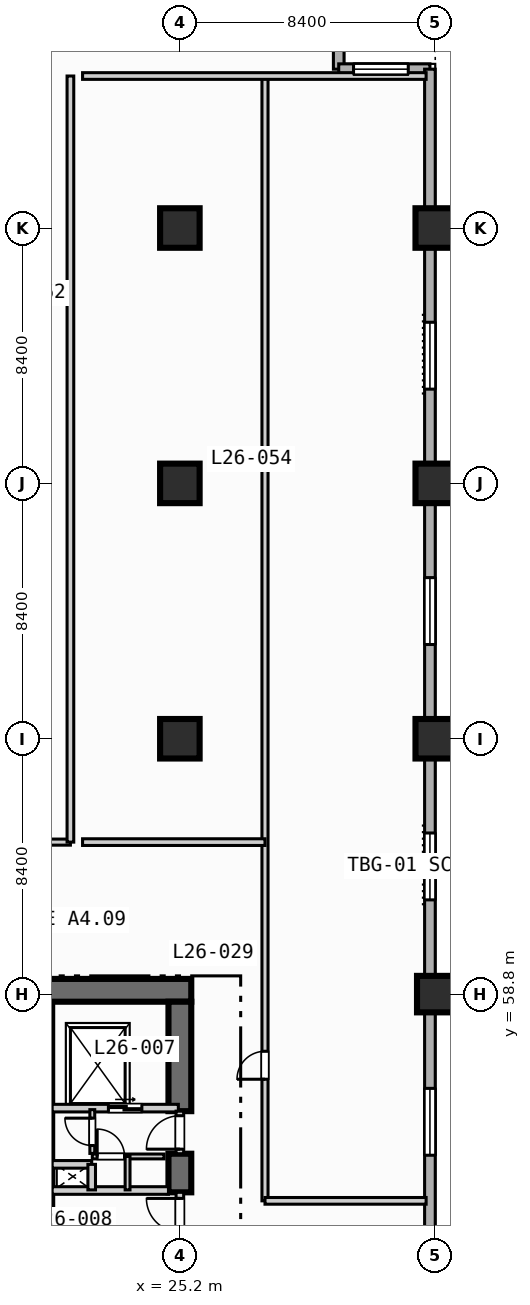
"""IFC4 building model, lengths in metres.
Left out: names, types, materials, properties, quantities, classifications, styles, units other than length and angle.
Written with IfcOpenShell. Run it as: python <this file> out.ifc"""

import sys

from ifc_helpers import new_model, si_unit, direction, frame, frame_2d, origin, origin_2d, place, context, subcontext, project, spatial, rectangle, extrude, element, fill, save


model = new_model("IFC4")
c1 = context("Model", 3, precision=1e-05, world=origin(), true_north=direction((0.0, 1.0)))
c2 = subcontext(c1, "Body", "Model", "MODEL_VIEW")
j1 = project(units=[si_unit("LENGTHUNIT", "METRE"), si_unit("PLANEANGLEUNIT", "RADIAN")], contexts=[c1])
p1 = place(None, origin())
s1 = spatial("IfcSite", under=j1, at=p1, CompositionType="ELEMENT")
p2 = place(p1, origin())
s2 = spatial("IfcBuilding", under=s1, at=p2, CompositionType="ELEMENT")
p3 = place(p2, frame((0.0, 0.0, 111.4)))
s3 = spatial("IfcBuildingStorey", under=s2, at=p3, CompositionType="ELEMENT", Elevation=111.4)
p4 = place(p3, frame((20.5, 58.925, 0.0), z_axis=(0.0, 0.0, 1.0), x_axis=(1.0, 0.0, 0.0)))
e1 = element("IfcWall", 1, at=p4, inside=s3, PredefinedType="SHEAR", context=c2, shape_type="SweptSolid", body=[
    extrude(rectangle(XDim=5.075, YDim=0.75, at=frame_2d((2.538, 0.0))), origin(), (0.0, 0.0, 1.0), 3.55),
])
p5 = place(p3, frame((25.2, 52.28, 0.0), z_axis=(0.0, 0.0, 1.0), x_axis=(0.0, 1.0, 0.0)))
e2 = element("IfcWall", 2, at=p5, inside=s3, PredefinedType="SHEAR", context=c2, shape_type="SweptSolid", body=[
    extrude(rectangle(XDim=1.27, YDim=0.75, at=frame_2d((0.635, 0.0))), origin(), (0.0, 0.0, 1.0), 3.55),
])
p6 = place(p3, frame((25.2, 54.95, 0.0), z_axis=(0.0, 0.0, 1.0), x_axis=(0.0, 1.0, 0.0)))
e3 = element("IfcWall", 3, at=p6, inside=s3, PredefinedType="SHEAR", context=c2, shape_type="SweptSolid", body=[
    extrude(rectangle(XDim=3.6, YDim=0.75, at=frame_2d((1.8, 0.0))), origin(), (0.0, 0.0, 1.0), 3.55),
])
for number, where, z_axis, x_axis in (
    (4, (25.2, 67.2, 0.0), (0.0, 0.0, 1.0), (1.0, 0.0, 0.0)),
    (5, (25.2, 75.6, 0.0), (0.0, 0.0, 1.0), (1.0, 0.0, 0.0)),
    (6, (25.2, 84.0, 0.0), (0.0, 0.0, 1.0), (1.0, 0.0, 0.0)),
):
    element("IfcColumn", number, at=place(p3, frame(where, z_axis=z_axis, x_axis=x_axis)), inside=s3, PredefinedType="COLUMN", context=c2, shape_type="SweptSolid", body=[
        extrude(rectangle(XDim=1.3, YDim=1.3, at=origin_2d()), origin(), (0.0, 0.0, 1.0), 3.8),
    ])
p7 = place(p3, frame((33.6, 58.8, 0.0), z_axis=(0.0, 0.0, 1.0), x_axis=(1.0, 0.0, 0.0)))
e7 = element("IfcColumn", 7, at=p7, inside=s3, PredefinedType="COLUMN", context=c2, shape_type="SweptSolid", body=[
    extrude(rectangle(XDim=1.2, YDim=1.2, at=origin_2d()), origin(), (0.0, 0.0, 1.0), 3.8),
])
for number, where, z_axis, x_axis in (
    (8, (33.6, 67.2, 0.0), (0.0, 0.0, 1.0), (1.0, 0.0, 0.0)),
    (9, (33.6, 75.6, 0.0), (0.0, 0.0, 1.0), (1.0, 0.0, 0.0)),
    (10, (33.6, 84.0, 0.0), (0.0, 0.0, 1.0), (1.0, 0.0, 0.0)),
):
    element("IfcColumn", number, at=place(p3, frame(where, z_axis=z_axis, x_axis=x_axis)), inside=s3, PredefinedType="COLUMN", context=c2, shape_type="SweptSolid", body=[
        extrude(rectangle(XDim=1.3, YDim=1.3, at=origin_2d()), origin(), (0.0, 0.0, 1.0), 3.8),
    ])
p8 = place(p3, frame((30.425, 92.225, 0.0), z_axis=(0.0, 0.0, 1.0), x_axis=(0.0, -1.0, 0.0)))
e11 = element("IfcWall", 11, at=p8, inside=s3, PredefinedType="STANDARD", context=c2, shape_type="SweptSolid", body=[
    extrude(rectangle(XDim=3.0, YDim=0.35, at=frame_2d((1.5, 0.0))), origin(), (0.0, 0.0, 1.0), 3.55),
])
p9 = place(p3, frame((30.425, 89.225, 0.0), z_axis=(0.0, 0.0, 1.0), x_axis=(1.0, 0.0, 0.0)))
e12 = element("IfcWall", 12, at=p9, inside=s3, PredefinedType="STANDARD", context=c2, shape_type="SweptSolid", body=[
    extrude(rectangle(XDim=3.0, YDim=0.35, at=frame_2d((1.5, 0.0))), origin(), (0.0, 0.0, 1.0), 3.55),
])
p10 = place(p9, frame((0.488, 0.0, 0.85)))
e13 = element("IfcOpeningElement", 13, at=p10, cuts=e12, PredefinedType="OPENING", context=c2, shape_type="SweptSolid", body=[
    extrude(rectangle(XDim=1.8, YDim=1.8, at=frame_2d((0.9, 0.9))), frame((0.0, 0.185, 0.0), z_axis=(0.0, -1.0, 0.0), x_axis=(1.0, 0.0, 0.0)), (0.0, 0.0, 1.0), 0.37),
])
p11 = place(p3, frame((33.425, 89.225, 0.0), z_axis=(0.0, 0.0, 1.0), x_axis=(0.0, -1.0, 0.0)))
e14 = element("IfcWall", 14, at=p11, inside=s3, PredefinedType="STANDARD", context=c2, shape_type="SweptSolid", body=[
    extrude(rectangle(XDim=55.8, YDim=0.35, at=frame_2d((27.9, 0.0))), origin(), (0.0, 0.0, 1.0), 3.55),
])
p12 = place(p11, frame((50.325, 0.0, 0.85)))
e15 = element("IfcOpeningElement", 15, at=p12, cuts=e14, PredefinedType="OPENING", context=c2, shape_type="SweptSolid", body=[
    extrude(rectangle(XDim=2.2, YDim=1.8, at=frame_2d((1.1, 0.9))), frame((0.0, 0.185, 0.0), z_axis=(0.0, -1.0, 0.0), x_axis=(1.0, 0.0, 0.0)), (0.0, 0.0, 1.0), 0.37),
])
p13 = place(p11, frame((33.525, 0.0, 0.85)))
e16 = element("IfcOpeningElement", 16, at=p13, cuts=e14, PredefinedType="OPENING", context=c2, shape_type="SweptSolid", body=[
    extrude(rectangle(XDim=2.2, YDim=1.8, at=frame_2d((1.1, 0.9))), frame((0.0, 0.185, 0.0), z_axis=(0.0, -1.0, 0.0), x_axis=(1.0, 0.0, 0.0)), (0.0, 0.0, 1.0), 0.37),
])
p14 = place(p11, frame((25.125, 0.0, 0.85)))
e17 = element("IfcOpeningElement", 17, at=p14, cuts=e14, PredefinedType="OPENING", context=c2, shape_type="SweptSolid", body=[
    extrude(rectangle(XDim=2.2, YDim=1.8, at=frame_2d((1.1, 0.9))), frame((0.0, 0.185, 0.0), z_axis=(0.0, -1.0, 0.0), x_axis=(1.0, 0.0, 0.0)), (0.0, 0.0, 1.0), 0.37),
])
p15 = place(p11, frame((16.725, 0.0, 0.85)))
e18 = element("IfcOpeningElement", 18, at=p15, cuts=e14, PredefinedType="OPENING", context=c2, shape_type="SweptSolid", body=[
    extrude(rectangle(XDim=2.2, YDim=1.8, at=frame_2d((1.1, 0.9))), frame((0.0, 0.185, 0.0), z_axis=(0.0, -1.0, 0.0), x_axis=(1.0, 0.0, 0.0)), (0.0, 0.0, 1.0), 0.37),
])
p16 = place(p11, frame((8.325, 0.0, 0.85)))
e19 = element("IfcOpeningElement", 19, at=p16, cuts=e14, PredefinedType="OPENING", context=c2, shape_type="SweptSolid", body=[
    extrude(rectangle(XDim=2.2, YDim=1.8, at=frame_2d((1.1, 0.9))), frame((0.0, 0.185, 0.0), z_axis=(0.0, -1.0, 0.0), x_axis=(1.0, 0.0, 0.0)), (0.0, 0.0, 1.0), 0.37),
])
p17 = place(p3, frame((25.2, 50.8, 0.0), z_axis=(0.0, 0.0, 1.0), x_axis=(0.0, 1.0, 0.0)))
e20 = element("IfcWall", 20, at=p17, inside=s3, PredefinedType="SOLIDWALL", context=c2, shape_type="SweptSolid", body=[
    extrude(rectangle(XDim=1.48, YDim=0.25, at=frame_2d((0.74, 0.0))), origin(), (0.0, 0.0, 1.0), 3.55),
])
p18 = place(p17, frame((0.18, 0.0, 0.0)))
e21 = element("IfcOpeningElement", 21, at=p18, cuts=e20, PredefinedType="OPENING", context=c2, shape_type="SweptSolid", body=[
    extrude(rectangle(XDim=1.1, YDim=2.15, at=frame_2d((0.55, 1.075))), frame((0.0, 0.135, 0.0), z_axis=(0.0, -1.0, 0.0), x_axis=(1.0, 0.0, 0.0)), (0.0, 0.0, 1.0), 0.27),
])
p19 = place(p3, frame((21.0, 52.34, 0.0), z_axis=(0.0, 0.0, 1.0), x_axis=(1.0, 0.0, 0.0)))
e22 = element("IfcWall", 22, at=p19, inside=s3, PredefinedType="SOLIDWALL", context=c2, shape_type="SweptSolid", body=[
    extrude(rectangle(XDim=3.825, YDim=0.25, at=frame_2d((1.913, 0.0))), origin(), (0.0, 0.0, 1.0), 3.55),
])
p20 = place(p3, frame((21.0, 55.05, 0.0), z_axis=(0.0, 0.0, 1.0), x_axis=(1.0, 0.0, 0.0)))
e23 = element("IfcWall", 23, at=p20, inside=s3, PredefinedType="SOLIDWALL", context=c2, shape_type="SweptSolid", body=[
    extrude(rectangle(XDim=4.15, YDim=0.25, at=frame_2d((2.075, 0.0))), origin(), (0.0, 0.0, 1.0), 3.55),
])
p21 = place(p20, frame((1.85, 0.0, 0.0)))
e24 = element("IfcOpeningElement", 24, at=p21, cuts=e23, PredefinedType="OPENING", context=c2, shape_type="SweptSolid", body=[
    extrude(rectangle(XDim=1.1, YDim=2.15, at=frame_2d((0.55, 1.075))), frame((0.0, 0.135, 0.0), z_axis=(0.0, -1.0, 0.0), x_axis=(1.0, 0.0, 0.0)), (0.0, 0.0, 1.0), 0.27),
])
p22 = place(p3, frame((25.2, 53.55, 0.0), z_axis=(0.0, 0.0, 1.0), x_axis=(0.0, 1.0, 0.0)))
e25 = element("IfcWall", 25, at=p22, inside=s3, PredefinedType="SOLIDWALL", context=c2, shape_type="SweptSolid", body=[
    extrude(rectangle(XDim=1.4, YDim=0.25, at=frame_2d((0.7, 0.0))), origin(), (0.0, 0.0, 1.0), 3.55),
])
p23 = place(p22, frame((0.15, 0.0, 0.0)))
e26 = element("IfcOpeningElement", 26, at=p23, cuts=e25, PredefinedType="OPENING", context=c2, shape_type="SweptSolid", body=[
    extrude(rectangle(XDim=1.1, YDim=2.15, at=frame_2d((0.55, 1.075))), frame((0.0, 0.135, 0.0), z_axis=(0.0, -1.0, 0.0), x_axis=(1.0, 0.0, 0.0)), (0.0, 0.0, 1.0), 0.27),
])
p24 = place(p3, frame((21.0, 53.2, 0.0), z_axis=(0.0, 0.0, 1.0), x_axis=(1.0, 0.0, 0.0)))
e27 = element("IfcWall", 27, at=p24, inside=s3, PredefinedType="SOLIDWALL", context=c2, shape_type="SweptSolid", body=[
    extrude(rectangle(XDim=1.3, YDim=0.25, at=frame_2d((0.65, 0.0))), origin(), (0.0, 0.0, 1.0), 3.55),
])
p25 = place(p3, frame((22.3, 52.36, 0.0), z_axis=(0.0, 0.0, 1.0), x_axis=(0.0, 1.0, 0.0)))
e28 = element("IfcWall", 28, at=p25, inside=s3, PredefinedType="SOLIDWALL", context=c2, shape_type="SweptSolid", body=[
    extrude(rectangle(XDim=0.84, YDim=0.25, at=frame_2d((0.42, 0.0))), origin(), (0.0, 0.0, 1.0), 3.55),
])
p26 = place(p3, frame((22.32, 53.56, 0.0), z_axis=(0.0, 0.0, 1.0), x_axis=(0.0, 1.0, 0.0)))
e29 = element("IfcWall", 29, at=p26, inside=s3, PredefinedType="PARTITIONING", context=c2, shape_type="SweptSolid", body=[
    extrude(rectangle(XDim=1.44, YDim=0.16, at=frame_2d((0.72, 0.0))), origin(), (0.0, 0.0, 1.0), 3.55),
])
p27 = place(p26, frame((0.26, 0.0, 0.0)))
e30 = element("IfcOpeningElement", 30, at=p27, cuts=e29, PredefinedType="OPENING", context=c2, shape_type="SweptSolid", body=[
    extrude(rectangle(XDim=0.9, YDim=2.1, at=frame_2d((0.45, 1.05))), frame((0.0, 0.09, 0.0), z_axis=(0.0, -1.0, 0.0), x_axis=(1.0, 0.0, 0.0)), (0.0, 0.0, 1.0), 0.18),
])
p28 = place(p3, frame((22.32, 53.46, 0.0), z_axis=(0.0, 0.0, 1.0), x_axis=(1.0, 0.0, 0.0)))
e31 = element("IfcWall", 31, at=p28, inside=s3, PredefinedType="PARTITIONING", context=c2, shape_type="SweptSolid", body=[
    extrude(rectangle(XDim=2.36, YDim=0.16, at=frame_2d((1.18, 0.0))), origin(), (0.0, 0.0, 1.0), 3.55),
])
p29 = place(p28, frame((0.16, 0.0, 0.0)))
e32 = element("IfcOpeningElement", 32, at=p29, cuts=e31, PredefinedType="OPENING", context=c2, shape_type="SweptSolid", body=[
    extrude(rectangle(XDim=0.9, YDim=2.1, at=frame_2d((0.45, 1.05))), frame((0.0, 0.09, 0.0), z_axis=(0.0, -1.0, 0.0), x_axis=(1.0, 0.0, 0.0)), (0.0, 0.0, 1.0), 0.18),
])
p30 = place(p3, frame((23.48, 52.36, 0.0), z_axis=(0.0, 0.0, 1.0), x_axis=(0.0, 1.0, 0.0)))
e33 = element("IfcWall", 33, at=p30, inside=s3, PredefinedType="PARTITIONING", context=c2, shape_type="SweptSolid", body=[
    extrude(rectangle(XDim=1.1, YDim=0.16, at=frame_2d((0.55, 0.0))), origin(), (0.0, 0.0, 1.0), 3.55),
])
p31 = place(p3, frame((3.4, 63.8, 0.0), z_axis=(0.0, 0.0, 1.0), x_axis=(1.0, 0.0, 0.0)))
e34 = element("IfcWall", 34, at=p31, inside=s3, PredefinedType="PARTITIONING", context=c2, shape_type="SweptSolid", body=[
    extrude(rectangle(XDim=18.2, YDim=0.2, at=frame_2d((9.1, 0.0))), origin(), (0.0, 0.0, 1.0), 3.55),
])
p32 = place(p31, frame((4.05, 0.0, 0.0)))
e35 = element("IfcOpeningElement", 35, at=p32, cuts=e34, PredefinedType="OPENING", context=c2, shape_type="SweptSolid", body=[
    extrude(rectangle(XDim=1.0, YDim=2.15, at=frame_2d((0.5, 1.075))), frame((0.0, 0.11, 0.0), z_axis=(0.0, -1.0, 0.0), x_axis=(1.0, 0.0, 0.0)), (0.0, 0.0, 1.0), 0.22),
])
p33 = place(p3, frame((21.6, 63.8, 0.0), z_axis=(0.0, 0.0, 1.0), x_axis=(0.0, 1.0, 0.0)))
e36 = element("IfcWall", 36, at=p33, inside=s3, PredefinedType="PARTITIONING", context=c2, shape_type="SweptSolid", body=[
    extrude(rectangle(XDim=25.2, YDim=0.22, at=frame_2d((12.6, 0.0))), origin(), (0.0, 0.0, 1.0), 3.55),
])
p34 = place(p3, frame((28.0, 52.0, 0.0), z_axis=(0.0, 0.0, 1.0), x_axis=(0.0, 1.0, 0.0)))
e37 = element("IfcWall", 37, at=p34, inside=s3, PredefinedType="PARTITIONING", context=c2, shape_type="SweptSolid", body=[
    extrude(rectangle(XDim=37.0, YDim=0.2, at=frame_2d((18.5, 0.0))), origin(), (0.0, 0.0, 1.0), 3.55),
])
p35 = place(p34, frame((4.0, 0.0, 0.0)))
e38 = element("IfcOpeningElement", 38, at=p35, cuts=e37, PredefinedType="OPENING", context=c2, shape_type="SweptSolid", body=[
    extrude(rectangle(XDim=0.92, YDim=2.1, at=frame_2d((0.46, 1.05))), frame((0.0, 0.11, 0.0), z_axis=(0.0, -1.0, 0.0), x_axis=(1.0, 0.0, 0.0)), (0.0, 0.0, 1.0), 0.22),
])
p36 = place(p3, frame((28.0, 52.0, 0.0), z_axis=(0.0, 0.0, 1.0), x_axis=(1.0, 0.0, 0.0)))
e39 = element("IfcWall", 39, at=p36, inside=s3, PredefinedType="PARTITIONING", context=c2, shape_type="SweptSolid", body=[
    extrude(rectangle(XDim=5.3, YDim=0.22, at=frame_2d((2.65, 0.0))), origin(), (0.0, 0.0, 1.0), 3.55),
])
p37 = place(p3, frame((22.0, 89.0, 0.0), z_axis=(0.0, 0.0, 1.0), x_axis=(1.0, 0.0, 0.0)))
e40 = element("IfcWall", 40, at=p37, inside=s3, PredefinedType="PARTITIONING", context=c2, shape_type="SweptSolid", body=[
    extrude(rectangle(XDim=11.3, YDim=0.22, at=frame_2d((5.65, 0.0))), origin(), (0.0, 0.0, 1.0), 3.55),
])
p38 = place(p3, frame((22.0, 63.8, 0.0), z_axis=(0.0, 0.0, 1.0), x_axis=(1.0, 0.0, 0.0)))
e41 = element("IfcWall", 41, at=p38, inside=s3, PredefinedType="PARTITIONING", context=c2, shape_type="SweptSolid", body=[
    extrude(rectangle(XDim=6.0, YDim=0.22, at=frame_2d((3.0, 0.0))), origin(), (0.0, 0.0, 1.0), 3.55),
])
p39 = place(p10, origin())
e42 = element("IfcWindow", 42, at=p39, inside=s3, PartitioningType="SINGLE_PANEL", PredefinedType="WINDOW", context=c2, shape_type="SweptSolid", body=[
    extrude(rectangle(XDim=1.8, YDim=1.8, at=frame_2d((0.9, 0.9))), frame((0.0, 0.03, 0.0), z_axis=(0.0, -1.0, 0.0), x_axis=(1.0, 0.0, 0.0)), (0.0, 0.0, 1.0), 0.06),
])
fill(e13, e42)
p40 = place(p13, origin())
e43 = element("IfcWindow", 43, at=p40, inside=s3, PartitioningType="SINGLE_PANEL", PredefinedType="WINDOW", context=c2, shape_type="SweptSolid", body=[
    extrude(rectangle(XDim=2.2, YDim=1.8, at=frame_2d((1.1, 0.9))), frame((0.0, 0.03, 0.0), z_axis=(0.0, -1.0, 0.0), x_axis=(1.0, 0.0, 0.0)), (0.0, 0.0, 1.0), 0.06),
])
fill(e16, e43)
p41 = place(p14, origin())
e44 = element("IfcWindow", 44, at=p41, inside=s3, PartitioningType="SINGLE_PANEL", PredefinedType="WINDOW", context=c2, shape_type="SweptSolid", body=[
    extrude(rectangle(XDim=2.2, YDim=1.8, at=frame_2d((1.1, 0.9))), frame((0.0, 0.03, 0.0), z_axis=(0.0, -1.0, 0.0), x_axis=(1.0, 0.0, 0.0)), (0.0, 0.0, 1.0), 0.06),
])
fill(e17, e44)
p42 = place(p15, origin())
e45 = element("IfcWindow", 45, at=p42, inside=s3, PartitioningType="SINGLE_PANEL", PredefinedType="WINDOW", context=c2, shape_type="SweptSolid", body=[
    extrude(rectangle(XDim=2.2, YDim=1.8, at=frame_2d((1.1, 0.9))), frame((0.0, 0.03, 0.0), z_axis=(0.0, -1.0, 0.0), x_axis=(1.0, 0.0, 0.0)), (0.0, 0.0, 1.0), 0.06),
])
fill(e18, e45)
p43 = place(p16, origin())
e46 = element("IfcWindow", 46, at=p43, inside=s3, PartitioningType="SINGLE_PANEL", PredefinedType="WINDOW", context=c2, shape_type="SweptSolid", body=[
    extrude(rectangle(XDim=2.2, YDim=1.8, at=frame_2d((1.1, 0.9))), frame((0.0, 0.03, 0.0), z_axis=(0.0, -1.0, 0.0), x_axis=(1.0, 0.0, 0.0)), (0.0, 0.0, 1.0), 0.06),
])
fill(e19, e46)
p44 = place(p18, origin())
e47 = element("IfcDoor", 47, at=p44, inside=s3, OperationType="SINGLE_SWING_RIGHT", PredefinedType="DOOR", context=c2, shape_type="SweptSolid", body=[
    extrude(rectangle(XDim=1.1, YDim=2.15, at=frame_2d((0.55, 1.075))), frame((0.0, 0.025, 0.0), z_axis=(0.0, -1.0, 0.0), x_axis=(1.0, 0.0, 0.0)), (0.0, 0.0, 1.0), 0.05),
])
fill(e21, e47)
p45 = place(p21, origin())
e48 = element("IfcDoor", 48, at=p45, inside=s3, OperationType="SLIDING_TO_LEFT", PredefinedType="DOOR", context=c2, shape_type="SweptSolid", body=[
    extrude(rectangle(XDim=1.1, YDim=2.15, at=frame_2d((0.55, 1.075))), frame((0.0, 0.025, 0.0), z_axis=(0.0, -1.0, 0.0), x_axis=(1.0, 0.0, 0.0)), (0.0, 0.0, 1.0), 0.05),
])
fill(e24, e48)
p46 = place(p23, origin())
e49 = element("IfcDoor", 49, at=p46, inside=s3, OperationType="SINGLE_SWING_LEFT", PredefinedType="DOOR", context=c2, shape_type="SweptSolid", body=[
    extrude(rectangle(XDim=1.1, YDim=2.15, at=frame_2d((0.55, 1.075))), frame((0.0, 0.025, 0.0), z_axis=(0.0, -1.0, 0.0), x_axis=(1.0, 0.0, 0.0)), (0.0, 0.0, 1.0), 0.05),
])
fill(e26, e49)
p47 = place(p27, origin())
e50 = element("IfcDoor", 50, at=p47, inside=s3, OperationType="SINGLE_SWING_RIGHT", PredefinedType="DOOR", context=c2, shape_type="SweptSolid", body=[
    extrude(rectangle(XDim=0.9, YDim=2.1, at=frame_2d((0.45, 1.05))), frame((0.0, 0.025, 0.0), z_axis=(0.0, -1.0, 0.0), x_axis=(1.0, 0.0, 0.0)), (0.0, 0.0, 1.0), 0.05),
])
fill(e30, e50)
p48 = place(p29, origin())
e51 = element("IfcDoor", 51, at=p48, inside=s3, OperationType="SINGLE_SWING_LEFT", PredefinedType="DOOR", context=c2, shape_type="SweptSolid", body=[
    extrude(rectangle(XDim=0.9, YDim=2.1, at=frame_2d((0.45, 1.05))), frame((0.0, 0.025, 0.0), z_axis=(0.0, -1.0, 0.0), x_axis=(1.0, 0.0, 0.0)), (0.0, 0.0, 1.0), 0.05),
])
fill(e32, e51)
p49 = place(p35, origin())
e52 = element("IfcDoor", 52, at=p49, inside=s3, OperationType="SINGLE_SWING_LEFT", PredefinedType="DOOR", context=c2, shape_type="SweptSolid", body=[
    extrude(rectangle(XDim=0.92, YDim=2.1, at=frame_2d((0.46, 1.05))), frame((0.0, 0.025, 0.0), z_axis=(0.0, -1.0, 0.0), x_axis=(1.0, 0.0, 0.0)), (0.0, 0.0, 1.0), 0.05),
])
fill(e38, e52)
save(model, sys.argv[1])
